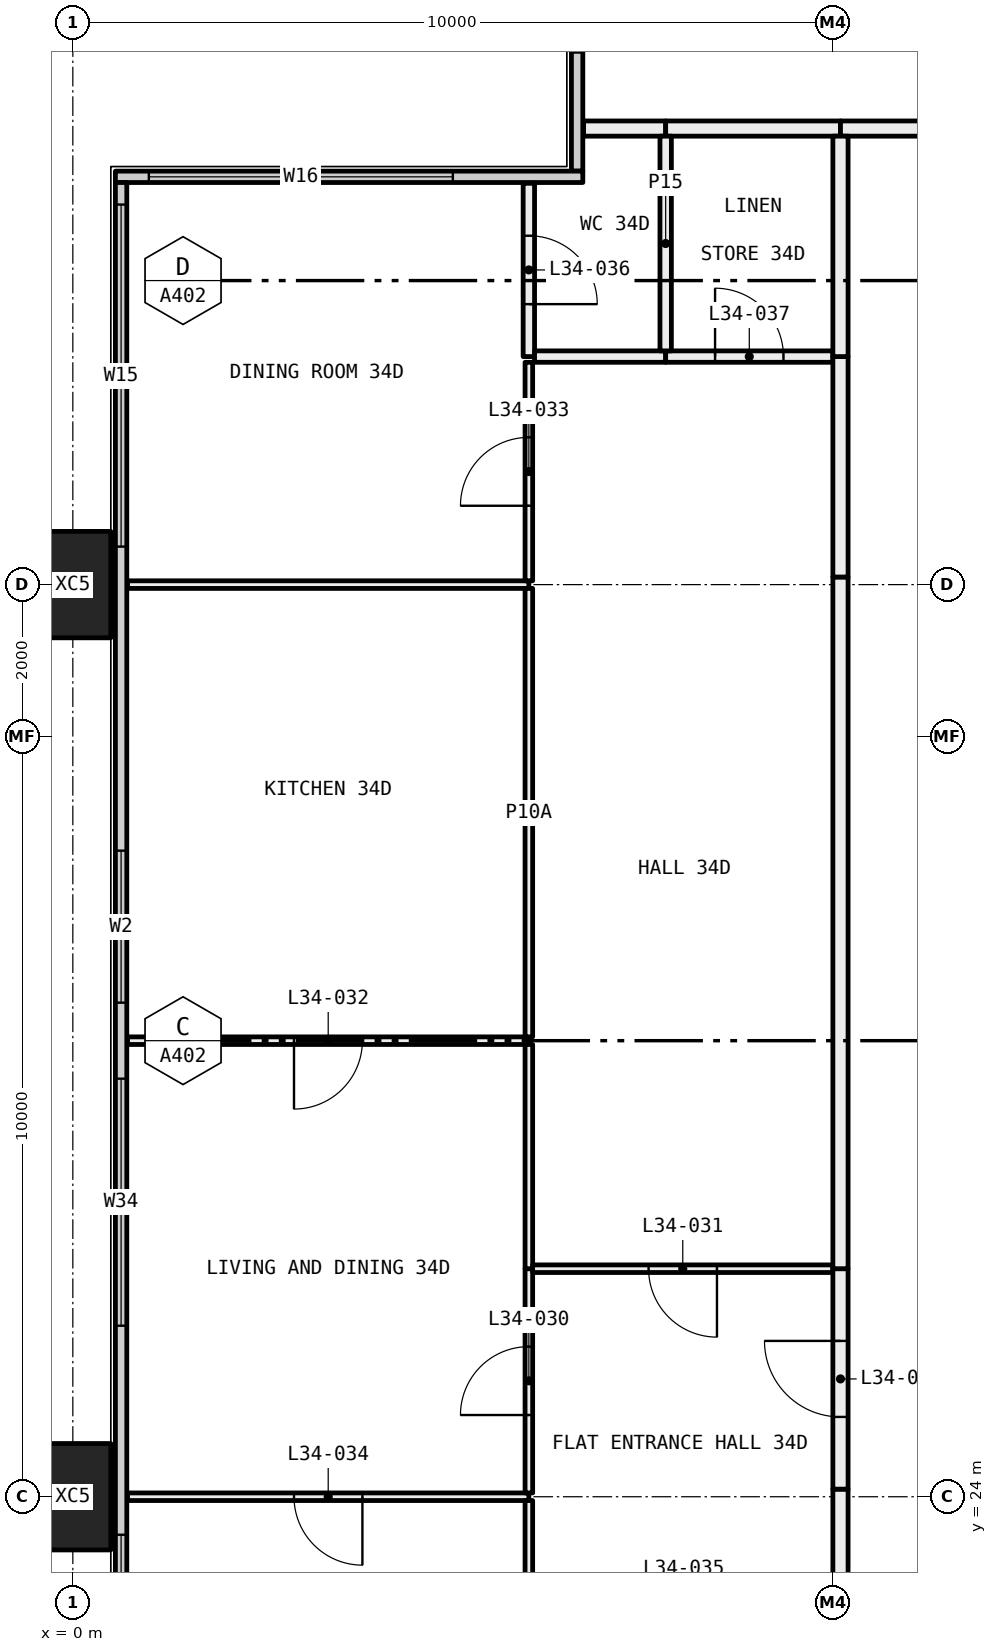
"""IFC4 building model, lengths in metres.
Left out: names, types, materials, properties, quantities, classifications, styles, units other than length and angle.
Written with IfcOpenShell. Run it as: python <this file> out.ifc"""

import sys

from ifc_helpers import new_model, si_unit, direction, frame, frame_2d, origin, origin_2d, place, context, subcontext, project, spatial, rectangle, hollow_rectangle, extrude, element, fill, save


model = new_model("IFC4")
c1 = context("Model", 3, precision=1e-05, world=origin(), true_north=direction((0.0, 1.0)))
c2 = subcontext(c1, "Body", "Model", "MODEL_VIEW")
j1 = project(units=[si_unit("LENGTHUNIT", "METRE"), si_unit("PLANEANGLEUNIT", "RADIAN")], contexts=[c1])
p1 = place(None, origin())
s1 = spatial("IfcSite", under=j1, at=p1, CompositionType="ELEMENT")
p2 = place(p1, origin())
s2 = spatial("IfcBuilding", under=s1, at=p2, CompositionType="ELEMENT")
p3 = place(p2, frame((0.0, 0.0, 131.1)))
s3 = spatial("IfcBuildingStorey", under=s2, at=p3, CompositionType="ELEMENT", Elevation=131.1)
for number, where, z_axis, x_axis in (
    (1, (0.0, 24.0, -0.4), (0.0, 0.0, 1.0), (0.0, 1.0, 0.0)),
    (2, (0.0, 36.0, -0.4), (0.0, 0.0, 1.0), (0.0, 1.0, 0.0)),
):
    element("IfcColumn", number, at=place(p3, frame(where, z_axis=z_axis, x_axis=x_axis)), inside=s3, PredefinedType="COLUMN", context=c2, shape_type="SweptSolid", body=[
        extrude(hollow_rectangle(XDim=1.4, YDim=1.0, WallThickness=0.055, at=origin_2d()), origin(), (0.0, 0.0, 1.0), 3.45),
    ])
p4 = place(p3, frame((6.635, 41.44, 0.0), z_axis=(0.0, 0.0, 1.0), x_axis=(0.0, 1.0, 0.0)))
e3 = element("IfcWall", 3, at=p4, inside=s3, PredefinedType="ELEMENTEDWALL", context=c2, shape_type="SweptSolid", body=[
    extrude(rectangle(XDim=5.85, YDim=0.15, at=frame_2d((2.925, 0.0))), origin(), (0.0, 0.0, 1.0), 3.05),
])
p5 = place(p4, frame((1.56, 0.0, 0.45)))
e4 = element("IfcOpeningElement", 4, at=p5, cuts=e3, PredefinedType="OPENING", context=c2, shape_type="SweptSolid", body=[
    extrude(rectangle(XDim=4.0, YDim=2.55, at=frame_2d((2.0, 1.275))), frame((0.0, 0.085, 0.0), z_axis=(0.0, -1.0, 0.0), x_axis=(1.0, 0.0, 0.0)), (0.0, 0.0, 1.0), 0.17),
])
p6 = place(p3, frame((0.56, 41.365, 0.0), z_axis=(0.0, 0.0, 1.0), x_axis=(1.0, 0.0, 0.0)))
e5 = element("IfcWall", 5, at=p6, inside=s3, PredefinedType="ELEMENTEDWALL", context=c2, shape_type="SweptSolid", body=[
    extrude(rectangle(XDim=6.15, YDim=0.15, at=frame_2d((3.075, 0.0))), origin(), (0.0, 0.0, 1.0), 3.05),
])
p7 = place(p6, frame((0.44, 0.0, 0.45)))
e6 = element("IfcOpeningElement", 6, at=p7, cuts=e5, PredefinedType="OPENING", context=c2, shape_type="SweptSolid", body=[
    extrude(rectangle(XDim=4.0, YDim=2.55, at=frame_2d((2.0, 1.275))), frame((0.0, 0.085, 0.0), z_axis=(0.0, -1.0, 0.0), x_axis=(1.0, 0.0, 0.0)), (0.0, 0.0, 1.0), 0.17),
])
p8 = place(p3, frame((0.635, 18.71, 0.0), z_axis=(0.0, 0.0, 1.0), x_axis=(0.0, 1.0, 0.0)))
e7 = element("IfcWall", 7, at=p8, inside=s3, PredefinedType="ELEMENTEDWALL", context=c2, shape_type="SweptSolid", body=[
    extrude(rectangle(XDim=22.58, YDim=0.15, at=frame_2d((11.29, 0.0))), origin(), (0.0, 0.0, 1.0), 3.05),
])
p9 = place(p8, frame((0.29, 0.0, 0.45)))
e8 = element("IfcOpeningElement", 8, at=p9, cuts=e7, PredefinedType="OPENING", context=c2, shape_type="SweptSolid", body=[
    extrude(rectangle(XDim=4.5, YDim=2.55, at=frame_2d((2.25, 1.275))), frame((0.0, 0.085, 0.0), z_axis=(0.0, -1.0, 0.0), x_axis=(1.0, 0.0, 0.0)), (0.0, 0.0, 1.0), 0.17),
])
p10 = place(p8, frame((7.54, 0.0, 0.45)))
e9 = element("IfcOpeningElement", 9, at=p10, cuts=e7, PredefinedType="OPENING", context=c2, shape_type="SweptSolid", body=[
    extrude(rectangle(XDim=3.25, YDim=2.55, at=frame_2d((1.625, 1.275))), frame((0.0, 0.085, 0.0), z_axis=(0.0, -1.0, 0.0), x_axis=(1.0, 0.0, 0.0)), (0.0, 0.0, 1.0), 0.17),
])
p11 = place(p8, frame((11.79, 0.0, 0.45)))
e10 = element("IfcOpeningElement", 10, at=p11, cuts=e7, PredefinedType="OPENING", context=c2, shape_type="SweptSolid", body=[
    extrude(rectangle(XDim=2.0, YDim=2.55, at=frame_2d((1.0, 1.275))), frame((0.0, 0.085, 0.0), z_axis=(0.0, -1.0, 0.0), x_axis=(1.0, 0.0, 0.0)), (0.0, 0.0, 1.0), 0.17),
])
p12 = place(p8, frame((17.79, 0.0, 0.45)))
e11 = element("IfcOpeningElement", 11, at=p12, cuts=e7, PredefinedType="OPENING", context=c2, shape_type="SweptSolid", body=[
    extrude(rectangle(XDim=4.5, YDim=2.55, at=frame_2d((2.25, 1.275))), frame((0.0, 0.085, 0.0), z_axis=(0.0, -1.0, 0.0), x_axis=(1.0, 0.0, 0.0)), (0.0, 0.0, 1.0), 0.17),
])
p13 = place(p3, frame((6.72, 42.0, 0.0), z_axis=(0.0, 0.0, 1.0), x_axis=(1.0, 0.0, 0.0)))
e12 = element("IfcWall", 12, at=p13, inside=s3, PredefinedType="PARTITIONING", context=c2, shape_type="SweptSolid", body=[
    extrude(rectangle(XDim=1.08, YDim=0.2, at=frame_2d((0.54, 0.0))), origin(), (0.0, 0.0, 1.0), 3.05),
])
p14 = place(p3, frame((7.8, 42.0, 0.0), z_axis=(0.0, 0.0, 1.0), x_axis=(1.0, 0.0, 0.0)))
e13 = element("IfcWall", 13, at=p14, inside=s3, PredefinedType="PARTITIONING", context=c2, shape_type="SweptSolid", body=[
    extrude(rectangle(XDim=2.3, YDim=0.2, at=frame_2d((1.15, 0.0))), origin(), (0.0, 0.0, 1.0), 3.05),
])
p15 = place(p3, frame((10.1, 42.0, 0.0), z_axis=(0.0, 0.0, 1.0), x_axis=(1.0, 0.0, 0.0)))
e14 = element("IfcWall", 14, at=p15, inside=s3, PredefinedType="PARTITIONING", context=c2, shape_type="SweptSolid", body=[
    extrude(rectangle(XDim=1.9, YDim=0.2, at=frame_2d((0.95, 0.0))), origin(), (0.0, 0.0, 1.0), 3.05),
])
p16 = place(p3, frame((6.0, 24.0, 0.0), z_axis=(0.0, 0.0, 1.0), x_axis=(-1.0, 0.0, 0.0)))
e15 = element("IfcWall", 15, at=p16, inside=s3, PredefinedType="PARTITIONING", context=c2, shape_type="SweptSolid", body=[
    extrude(rectangle(XDim=5.28, YDim=0.1, at=frame_2d((2.64, 0.0))), origin(), (0.0, 0.0, 1.0), 2.45),
])
p17 = place(p16, frame((2.19, 0.0, 0.0)))
e16 = element("IfcOpeningElement", 16, at=p17, cuts=e15, PredefinedType="OPENING", context=c2, shape_type="SweptSolid", body=[
    extrude(rectangle(XDim=0.9, YDim=2.1, at=frame_2d((0.45, 1.05))), frame((0.0, 0.06, 0.0), z_axis=(0.0, -1.0, 0.0), x_axis=(1.0, 0.0, 0.0)), (0.0, 0.0, 1.0), 0.12),
])
p18 = place(p3, frame((6.0, 22.575, 0.0), z_axis=(0.0, 0.0, 1.0), x_axis=(0.0, 1.0, 0.0)))
e17 = element("IfcWall", 17, at=p18, inside=s3, PredefinedType="PARTITIONING", context=c2, shape_type="SweptSolid", body=[
    extrude(rectangle(XDim=1.375, YDim=0.1, at=frame_2d((0.688, 0.0))), origin(), (0.0, 0.0, 1.0), 2.45),
])
p19 = place(p3, frame((6.0, 30.0, 0.0), z_axis=(0.0, 0.0, 1.0), x_axis=(-1.0, 0.0, 0.0)))
e18 = element("IfcWall", 18, at=p19, inside=s3, PredefinedType="PARTITIONING", context=c2, shape_type="SweptSolid", body=[
    extrude(rectangle(XDim=5.28, YDim=0.1, at=frame_2d((2.64, 0.0))), origin(), (0.0, 0.0, 1.0), 3.05),
])
p20 = place(p19, frame((2.19, 0.0, 0.0)))
e19 = element("IfcOpeningElement", 19, at=p20, cuts=e18, PredefinedType="OPENING", context=c2, shape_type="SweptSolid", body=[
    extrude(rectangle(XDim=0.9, YDim=2.1, at=frame_2d((0.45, 1.05))), frame((0.0, 0.06, 0.0), z_axis=(0.0, -1.0, 0.0), x_axis=(1.0, 0.0, 0.0)), (0.0, 0.0, 1.0), 0.12),
])
p21 = place(p3, frame((6.0, 24.05, 0.0), z_axis=(0.0, 0.0, 1.0), x_axis=(0.0, 1.0, 0.0)))
e20 = element("IfcWall", 20, at=p21, inside=s3, PredefinedType="PARTITIONING", context=c2, shape_type="SweptSolid", body=[
    extrude(rectangle(XDim=2.95, YDim=0.1, at=frame_2d((1.475, 0.0))), origin(), (0.0, 0.0, 1.0), 2.45),
])
p22 = place(p21, frame((1.025, 0.0, 0.0)))
e21 = element("IfcOpeningElement", 21, at=p22, cuts=e20, PredefinedType="OPENING", context=c2, shape_type="SweptSolid", body=[
    extrude(rectangle(XDim=0.9, YDim=2.1, at=frame_2d((0.45, 1.05))), frame((0.0, 0.06, 0.0), z_axis=(0.0, -1.0, 0.0), x_axis=(1.0, 0.0, 0.0)), (0.0, 0.0, 1.0), 0.12),
])
p23 = place(p3, frame((6.0, 27.0, 0.0), z_axis=(0.0, 0.0, 1.0), x_axis=(0.0, 1.0, 0.0)))
e22 = element("IfcWall", 22, at=p23, inside=s3, PredefinedType="PARTITIONING", context=c2, shape_type="SweptSolid", body=[
    extrude(rectangle(XDim=2.95, YDim=0.1, at=frame_2d((1.475, 0.0))), origin(), (0.0, 0.0, 1.0), 3.05),
])
p24 = place(p3, frame((6.0, 36.0, 0.0), z_axis=(0.0, 0.0, 1.0), x_axis=(-1.0, 0.0, 0.0)))
e23 = element("IfcWall", 23, at=p24, inside=s3, PredefinedType="PARTITIONING", context=c2, shape_type="SweptSolid", body=[
    extrude(rectangle(XDim=5.28, YDim=0.1, at=frame_2d((2.64, 0.0))), origin(), (0.0, 0.0, 1.0), 2.45),
])
p25 = place(p3, frame((6.0, 30.05, 0.0), z_axis=(0.0, 0.0, 1.0), x_axis=(0.0, 1.0, 0.0)))
e24 = element("IfcWall", 24, at=p25, inside=s3, PredefinedType="PARTITIONING", context=c2, shape_type="SweptSolid", body=[
    extrude(rectangle(XDim=5.9, YDim=0.1, at=frame_2d((2.95, 0.0))), origin(), (0.0, 0.0, 1.0), 2.45),
])
p26 = place(p3, frame((6.0, 36.05, 0.0), z_axis=(0.0, 0.0, 1.0), x_axis=(0.0, 1.0, 0.0)))
e25 = element("IfcWall", 25, at=p26, inside=s3, PredefinedType="PARTITIONING", context=c2, shape_type="SweptSolid", body=[
    extrude(rectangle(XDim=2.875, YDim=0.1, at=frame_2d((1.438, 0.0))), origin(), (0.0, 0.0, 1.0), 2.45),
])
p27 = place(p26, frame((0.988, 0.0, 0.0)))
e26 = element("IfcOpeningElement", 26, at=p27, cuts=e25, PredefinedType="OPENING", context=c2, shape_type="SweptSolid", body=[
    extrude(rectangle(XDim=0.9, YDim=2.1, at=frame_2d((0.45, 1.05))), frame((0.0, 0.06, 0.0), z_axis=(0.0, -1.0, 0.0), x_axis=(1.0, 0.0, 0.0)), (0.0, 0.0, 1.0), 0.12),
])
p28 = place(p3, frame((6.0, 39.0, 0.0), z_axis=(0.0, 0.0, 1.0), x_axis=(0.0, 1.0, 0.0)))
e27 = element("IfcWall", 27, at=p28, inside=s3, PredefinedType="PARTITIONING", context=c2, shape_type="SweptSolid", body=[
    extrude(rectangle(XDim=2.28, YDim=0.15, at=frame_2d((1.14, 0.0))), origin(), (0.0, 0.0, 1.0), 3.05),
])
p29 = place(p28, frame((0.69, 0.0, 0.0)))
e28 = element("IfcOpeningElement", 28, at=p29, cuts=e27, PredefinedType="OPENING", context=c2, shape_type="SweptSolid", body=[
    extrude(rectangle(XDim=0.9, YDim=2.1, at=frame_2d((0.45, 1.05))), frame((0.0, 0.085, 0.0), z_axis=(0.0, -1.0, 0.0), x_axis=(1.0, 0.0, 0.0)), (0.0, 0.0, 1.0), 0.17),
])
p30 = place(p3, frame((10.0, 27.0, 0.0), z_axis=(0.0, 0.0, 1.0), x_axis=(-1.0, 0.0, 0.0)))
e29 = element("IfcWall", 29, at=p30, inside=s3, PredefinedType="PARTITIONING", context=c2, shape_type="SweptSolid", body=[
    extrude(rectangle(XDim=3.95, YDim=0.1, at=frame_2d((1.975, 0.0))), origin(), (0.0, 0.0, 1.0), 3.05),
])
p31 = place(p30, frame((1.525, 0.0, 0.0)))
e30 = element("IfcOpeningElement", 30, at=p31, cuts=e29, PredefinedType="OPENING", context=c2, shape_type="SweptSolid", body=[
    extrude(rectangle(XDim=0.9, YDim=2.1, at=frame_2d((0.45, 1.05))), frame((0.0, 0.06, 0.0), z_axis=(0.0, -1.0, 0.0), x_axis=(1.0, 0.0, 0.0)), (0.0, 0.0, 1.0), 0.12),
])
p32 = place(p3, frame((10.1, 22.5, 0.0), z_axis=(0.0, 0.0, 1.0), x_axis=(0.0, 1.0, 0.0)))
e31 = element("IfcWall", 31, at=p32, inside=s3, PredefinedType="PARTITIONING", context=c2, shape_type="SweptSolid", body=[
    extrude(rectangle(XDim=1.6, YDim=0.2, at=frame_2d((0.8, 0.0))), origin(), (0.0, 0.0, 1.0), 2.45),
])
p33 = place(p3, frame((10.1, 24.1, 0.0), z_axis=(0.0, 0.0, 1.0), x_axis=(0.0, 1.0, 0.0)))
e32 = element("IfcWall", 32, at=p33, inside=s3, PredefinedType="PARTITIONING", context=c2, shape_type="SweptSolid", body=[
    extrude(rectangle(XDim=2.9, YDim=0.2, at=frame_2d((1.45, 0.0))), origin(), (0.0, 0.0, 1.0), 3.05),
])
p34 = place(p33, frame((0.95, 0.0, 0.0)))
e33 = element("IfcOpeningElement", 33, at=p34, cuts=e32, PredefinedType="OPENING", context=c2, shape_type="SweptSolid", body=[
    extrude(rectangle(XDim=1.0, YDim=2.1, at=frame_2d((0.5, 1.05))), frame((0.0, 0.11, 0.0), z_axis=(0.0, -1.0, 0.0), x_axis=(1.0, 0.0, 0.0)), (0.0, 0.0, 1.0), 0.22),
])
p35 = place(p3, frame((7.8, 39.0, 0.0), z_axis=(0.0, 0.0, 1.0), x_axis=(-1.0, 0.0, 0.0)))
e34 = element("IfcWall", 34, at=p35, inside=s3, PredefinedType="PARTITIONING", context=c2, shape_type="SweptSolid", body=[
    extrude(rectangle(XDim=1.725, YDim=0.15, at=frame_2d((0.863, 0.0))), origin(), (0.0, 0.0, 1.0), 3.05),
])
p36 = place(p3, frame((10.0, 39.0, 0.0), z_axis=(0.0, 0.0, 1.0), x_axis=(-1.0, 0.0, 0.0)))
e35 = element("IfcWall", 35, at=p36, inside=s3, PredefinedType="PARTITIONING", context=c2, shape_type="SweptSolid", body=[
    extrude(rectangle(XDim=2.2, YDim=0.15, at=frame_2d((1.1, 0.0))), origin(), (0.0, 0.0, 1.0), 3.05),
])
p37 = place(p36, frame((0.65, 0.0, 0.0)))
e36 = element("IfcOpeningElement", 36, at=p37, cuts=e35, PredefinedType="OPENING", context=c2, shape_type="SweptSolid", body=[
    extrude(rectangle(XDim=0.9, YDim=2.1, at=frame_2d((0.45, 1.05))), frame((0.0, 0.085, 0.0), z_axis=(0.0, -1.0, 0.0), x_axis=(1.0, 0.0, 0.0)), (0.0, 0.0, 1.0), 0.17),
])
p38 = place(p3, frame((10.1, 27.0, 0.0), z_axis=(0.0, 0.0, 1.0), x_axis=(0.0, 1.0, 0.0)))
e37 = element("IfcWall", 37, at=p38, inside=s3, PredefinedType="PARTITIONING", context=c2, shape_type="SweptSolid", body=[
    extrude(rectangle(XDim=9.1, YDim=0.2, at=frame_2d((4.55, 0.0))), origin(), (0.0, 0.0, 1.0), 2.45),
])
p39 = place(p3, frame((10.1, 36.1, 0.0), z_axis=(0.0, 0.0, 1.0), x_axis=(0.0, 1.0, 0.0)))
e38 = element("IfcWall", 38, at=p39, inside=s3, PredefinedType="PARTITIONING", context=c2, shape_type="SweptSolid", body=[
    extrude(rectangle(XDim=2.9, YDim=0.2, at=frame_2d((1.45, 0.0))), origin(), (0.0, 0.0, 1.0), 3.05),
])
p40 = place(p3, frame((7.8, 39.075, 0.0), z_axis=(0.0, 0.0, 1.0), x_axis=(0.0, 1.0, 0.0)))
e39 = element("IfcWall", 39, at=p40, inside=s3, PredefinedType="PARTITIONING", context=c2, shape_type="SweptSolid", body=[
    extrude(rectangle(XDim=2.825, YDim=0.15, at=frame_2d((1.413, 0.0))), origin(), (0.0, 0.0, 1.0), 3.05),
])
p41 = place(p3, frame((10.1, 39.0, 0.0), z_axis=(0.0, 0.0, 1.0), x_axis=(0.0, 1.0, 0.0)))
e40 = element("IfcWall", 40, at=p41, inside=s3, PredefinedType="PARTITIONING", context=c2, shape_type="SweptSolid", body=[
    extrude(rectangle(XDim=2.9, YDim=0.2, at=frame_2d((1.45, 0.0))), origin(), (0.0, 0.0, 1.0), 3.05),
])
p42 = place(p7, origin())
e41 = element("IfcWindow", 41, at=p42, inside=s3, PartitioningType="SINGLE_PANEL", PredefinedType="WINDOW", context=c2, shape_type="SweptSolid", body=[
    extrude(rectangle(XDim=4.0, YDim=2.55, at=frame_2d((2.0, 1.275))), frame((0.0, 0.03, 0.0), z_axis=(0.0, -1.0, 0.0), x_axis=(1.0, 0.0, 0.0)), (0.0, 0.0, 1.0), 0.06),
])
fill(e6, e41)
p43 = place(p9, origin())
e42 = element("IfcWindow", 42, at=p43, inside=s3, PartitioningType="SINGLE_PANEL", PredefinedType="WINDOW", context=c2, shape_type="SweptSolid", body=[
    extrude(rectangle(XDim=4.5, YDim=2.55, at=frame_2d((2.25, 1.275))), frame((0.0, 0.03, 0.0), z_axis=(0.0, -1.0, 0.0), x_axis=(1.0, 0.0, 0.0)), (0.0, 0.0, 1.0), 0.06),
])
fill(e8, e42)
p44 = place(p10, origin())
e43 = element("IfcWindow", 43, at=p44, inside=s3, PartitioningType="SINGLE_PANEL", PredefinedType="WINDOW", context=c2, shape_type="SweptSolid", body=[
    extrude(rectangle(XDim=3.25, YDim=2.55, at=frame_2d((1.625, 1.275))), frame((0.0, 0.03, 0.0), z_axis=(0.0, -1.0, 0.0), x_axis=(1.0, 0.0, 0.0)), (0.0, 0.0, 1.0), 0.06),
])
fill(e9, e43)
p45 = place(p11, origin())
e44 = element("IfcWindow", 44, at=p45, inside=s3, PartitioningType="SINGLE_PANEL", PredefinedType="WINDOW", context=c2, shape_type="SweptSolid", body=[
    extrude(rectangle(XDim=2.0, YDim=2.55, at=frame_2d((1.0, 1.275))), frame((0.0, 0.03, 0.0), z_axis=(0.0, -1.0, 0.0), x_axis=(1.0, 0.0, 0.0)), (0.0, 0.0, 1.0), 0.06),
])
fill(e10, e44)
p46 = place(p12, origin())
e45 = element("IfcWindow", 45, at=p46, inside=s3, PartitioningType="SINGLE_PANEL", PredefinedType="WINDOW", context=c2, shape_type="SweptSolid", body=[
    extrude(rectangle(XDim=4.5, YDim=2.55, at=frame_2d((2.25, 1.275))), frame((0.0, 0.03, 0.0), z_axis=(0.0, -1.0, 0.0), x_axis=(1.0, 0.0, 0.0)), (0.0, 0.0, 1.0), 0.06),
])
fill(e11, e45)
p47 = place(p34, origin())
e46 = element("IfcDoor", 46, at=p47, inside=s3, OperationType="SINGLE_SWING_LEFT", PredefinedType="DOOR", context=c2, shape_type="SweptSolid", body=[
    extrude(rectangle(XDim=1.0, YDim=2.1, at=frame_2d((0.5, 1.05))), frame((0.0, 0.025, 0.0), z_axis=(0.0, -1.0, 0.0), x_axis=(1.0, 0.0, 0.0)), (0.0, 0.0, 1.0), 0.05),
])
fill(e33, e46)
p48 = place(p22, origin())
e47 = element("IfcDoor", 47, at=p48, inside=s3, OperationType="SINGLE_SWING_RIGHT", PredefinedType="DOOR", context=c2, shape_type="SweptSolid", body=[
    extrude(rectangle(XDim=0.9, YDim=2.1, at=frame_2d((0.45, 1.05))), frame((0.0, 0.025, 0.0), z_axis=(0.0, -1.0, 0.0), x_axis=(1.0, 0.0, 0.0)), (0.0, 0.0, 1.0), 0.05),
])
fill(e21, e47)
p49 = place(p31, origin())
e48 = element("IfcDoor", 48, at=p49, inside=s3, OperationType="SINGLE_SWING_RIGHT", PredefinedType="DOOR", context=c2, shape_type="SweptSolid", body=[
    extrude(rectangle(XDim=0.9, YDim=2.1, at=frame_2d((0.45, 1.05))), frame((0.0, 0.025, 0.0), z_axis=(0.0, -1.0, 0.0), x_axis=(1.0, 0.0, 0.0)), (0.0, 0.0, 1.0), 0.05),
])
fill(e30, e48)
p50 = place(p20, origin())
e49 = element("IfcDoor", 49, at=p50, inside=s3, OperationType="SINGLE_SWING_LEFT", PredefinedType="DOOR", context=c2, shape_type="SweptSolid", body=[
    extrude(rectangle(XDim=0.9, YDim=2.1, at=frame_2d((0.45, 1.05))), frame((0.0, 0.025, 0.0), z_axis=(0.0, -1.0, 0.0), x_axis=(1.0, 0.0, 0.0)), (0.0, 0.0, 1.0), 0.05),
])
fill(e19, e49)
p51 = place(p27, origin())
e50 = element("IfcDoor", 50, at=p51, inside=s3, OperationType="SINGLE_SWING_RIGHT", PredefinedType="DOOR", context=c2, shape_type="SweptSolid", body=[
    extrude(rectangle(XDim=0.9, YDim=2.1, at=frame_2d((0.45, 1.05))), frame((0.0, 0.025, 0.0), z_axis=(0.0, -1.0, 0.0), x_axis=(1.0, 0.0, 0.0)), (0.0, 0.0, 1.0), 0.05),
])
fill(e26, e50)
p52 = place(p17, origin())
e51 = element("IfcDoor", 51, at=p52, inside=s3, OperationType="SINGLE_SWING_RIGHT", PredefinedType="DOOR", context=c2, shape_type="SweptSolid", body=[
    extrude(rectangle(XDim=0.9, YDim=2.1, at=frame_2d((0.45, 1.05))), frame((0.0, 0.025, 0.0), z_axis=(0.0, -1.0, 0.0), x_axis=(1.0, 0.0, 0.0)), (0.0, 0.0, 1.0), 0.05),
])
fill(e16, e51)
p53 = place(p29, frame((0.9, 0.0, 0.0), x_axis=(-1.0, 0.0, 0.0)))
e52 = element("IfcDoor", 52, at=p53, inside=s3, OperationType="SINGLE_SWING_LEFT", PredefinedType="DOOR", context=c2, shape_type="SweptSolid", body=[
    extrude(rectangle(XDim=0.9, YDim=2.1, at=frame_2d((0.45, 1.05))), frame((0.0, 0.025, 0.0), z_axis=(0.0, -1.0, 0.0), x_axis=(1.0, 0.0, 0.0)), (0.0, 0.0, 1.0), 0.05),
])
fill(e28, e52)
p54 = place(p37, frame((0.9, 0.0, 0.0), x_axis=(-1.0, 0.0, 0.0)))
e53 = element("IfcDoor", 53, at=p54, inside=s3, OperationType="SINGLE_SWING_RIGHT", PredefinedType="DOOR", context=c2, shape_type="SweptSolid", body=[
    extrude(rectangle(XDim=0.9, YDim=2.1, at=frame_2d((0.45, 1.05))), frame((0.0, 0.025, 0.0), z_axis=(0.0, -1.0, 0.0), x_axis=(1.0, 0.0, 0.0)), (0.0, 0.0, 1.0), 0.05),
])
fill(e36, e53)
save(model, sys.argv[1])
